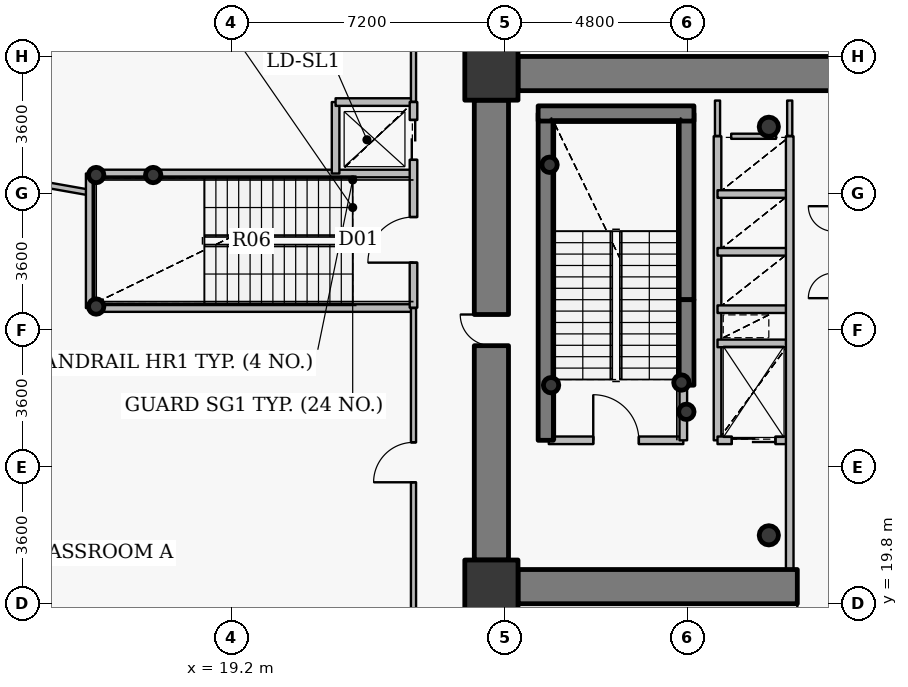
"""IFC4 building model, lengths in metres.
Left out: names, types, materials, properties, quantities, classifications, styles, units other than length and angle.
Written with IfcOpenShell. Run it as: python <this file> out.ifc"""

import sys

from ifc_helpers import new_model, si_unit, direction, frame, frame_2d, origin, origin_2d, place, context, subcontext, project, spatial, rectangle, hollow_circle, extrude, source, transform, mapped, element, fill, save


model = new_model("IFC4")
c1 = context("Model", 3, precision=1e-05, world=origin(), true_north=direction((0.0, 1.0)))
c2 = subcontext(c1, "Body", "Model", "MODEL_VIEW")
j1 = project(units=[si_unit("LENGTHUNIT", "METRE"), si_unit("PLANEANGLEUNIT", "RADIAN")], contexts=[c1])
p1 = place(None, origin())
s1 = spatial("IfcSite", under=j1, at=p1, CompositionType="ELEMENT")
p2 = place(p1, origin())
s2 = spatial("IfcBuilding", under=s1, at=p2, CompositionType="ELEMENT")
p3 = place(p2, frame((0.0, 0.0, 36.6)))
s3 = spatial("IfcBuildingStorey", under=s2, at=p3, CompositionType="ELEMENT", Elevation=36.6)
for number, where, z_axis, x_axis in (
    (1, (26.05, 20.25, 0.0), (0.0, 0.0, 1.0), (1.0, 0.0, 0.0)),
    (2, (26.05, 33.75, 0.0), (0.0, 0.0, 1.0), (1.0, 0.0, 0.0)),
):
    element("IfcColumn", number, at=place(p3, frame(where, z_axis=z_axis, x_axis=x_axis)), inside=s3, PredefinedType="COLUMN", context=c2, shape_type="SweptSolid", body=[
        extrude(rectangle(XDim=1.4, YDim=1.4, at=origin_2d()), origin(), (0.0, 0.0, 1.0), 4.2),
    ])
for number, where, z_axis, x_axis in (
    (3, (33.35, 21.6, 0.0), (0.0, 0.0, 1.0), (1.0, 0.0, 0.0)),
    (4, (33.35, 32.35, 0.0), (0.0, 0.0, 1.0), (1.0, 0.0, 0.0)),
):
    element("IfcColumn", number, at=place(p3, frame(where, z_axis=z_axis, x_axis=x_axis)), inside=s3, PredefinedType="COLUMN", context=c2, shape_type="SweptSolid", body=[
        extrude(hollow_circle(Radius=0.254, WallThickness=0.02, at=origin_2d()), origin(), (0.0, 0.0, 1.0), 4.2),
    ])
p4 = place(p3, frame((27.48, 24.1, 0.0), z_axis=(0.0, 0.0, 1.0), x_axis=(0.0, 1.0, 0.0)))
e5 = element("IfcWall", 5, at=p4, inside=s3, PredefinedType="SHEAR", context=c2, shape_type="SweptSolid", body=[
    extrude(rectangle(XDim=8.6, YDim=0.4, at=frame_2d((4.3, 0.0))), origin(), (0.0, 0.0, 1.0), 4.2),
])
p5 = place(p3, frame((31.18, 27.8, 0.0), z_axis=(0.0, 0.0, 1.0), x_axis=(0.0, 1.0, 0.0)))
e6 = element("IfcWall", 6, at=p5, inside=s3, PredefinedType="SHEAR", context=c2, shape_type="SweptSolid", body=[
    extrude(rectangle(XDim=4.9, YDim=0.4, at=frame_2d((2.45, 0.0))), origin(), (0.0, 0.0, 1.0), 4.2),
])
p6 = place(p3, frame((27.28, 32.7, 0.0), z_axis=(0.0, 0.0, 1.0), x_axis=(1.0, 0.0, 0.0)))
e7 = element("IfcWall", 7, at=p6, inside=s3, PredefinedType="SHEAR", context=c2, shape_type="SweptSolid", body=[
    extrude(rectangle(XDim=4.1, YDim=0.4, at=frame_2d((2.05, 0.0))), origin(), (0.0, 0.0, 1.0), 4.2),
])
for number, where, z_axis, x_axis in (
    (8, (27.58, 31.35, 0.0), (0.0, 0.0, 1.0), (1.0, 0.0, 0.0)),
    (9, (31.05, 25.62, 0.0), (0.0, 0.0, 1.0), (1.0, 0.0, 0.0)),
    (10, (31.18, 24.85, 0.0), (0.0, 0.0, 1.0), (1.0, 0.0, 0.0)),
    (11, (27.62, 25.55, 0.0), (0.0, 0.0, 1.0), (1.0, 0.0, 0.0)),
    (12, (15.65, 27.62, 0.0), (0.0, 0.0, 1.0), (1.0, 0.0, 0.0)),
    (13, (15.65, 31.08, 0.0), (0.0, 0.0, 1.0), (1.0, 0.0, 0.0)),
    (14, (17.15, 31.08, 0.0), (0.0, 0.0, 1.0), (1.0, 0.0, 0.0)),
):
    element("IfcColumn", number, at=place(p3, frame(where, z_axis=z_axis, x_axis=x_axis)), inside=s3, PredefinedType="COLUMN", context=c2, shape_type="SweptSolid", body=[
        extrude(hollow_circle(Radius=0.203, WallThickness=0.016, at=origin_2d()), origin(), (0.0, 0.0, 1.0), 4.2),
    ])
p7 = place(p3, frame((26.75, 33.75, 0.0), z_axis=(0.0, 0.0, 1.0), x_axis=(1.0, 0.0, 0.0)))
e15 = element("IfcWall", 15, at=p7, inside=s3, PredefinedType="SHEAR", context=c2, shape_type="SweptSolid", body=[
    extrude(rectangle(XDim=18.5, YDim=0.9, at=frame_2d((9.25, 0.0))), origin(), (0.0, 0.0, 1.0), 3.4),
])
p8 = place(p3, frame((45.25, 20.25, 0.0), z_axis=(0.0, 0.0, 1.0), x_axis=(-1.0, 0.0, 0.0)))
e16 = element("IfcWall", 16, at=p8, inside=s3, PredefinedType="SHEAR", context=c2, shape_type="SweptSolid", body=[
    extrude(rectangle(XDim=18.5, YDim=0.9, at=frame_2d((9.25, 0.0))), origin(), (0.0, 0.0, 1.0), 3.4),
])
p9 = place(p8, frame((10.0, 0.0, 0.0)))
e17 = element("IfcOpeningElement", 17, at=p9, cuts=e16, PredefinedType="OPENING", context=c2, shape_type="SweptSolid", body=[
    extrude(rectangle(XDim=1.15, YDim=2.15, at=origin_2d()), frame((0.575, 0.46, 1.075), z_axis=(0.0, -1.0, 0.0), x_axis=(1.0, 0.0, 0.0)), (0.0, 0.0, 1.0), 0.92),
])
p10 = place(p3, frame((26.05, 20.95, 0.0), z_axis=(0.0, 0.0, 1.0), x_axis=(0.0, 1.0, 0.0)))
e18 = element("IfcWall", 18, at=p10, inside=s3, PredefinedType="SHEAR", context=c2, shape_type="SweptSolid", body=[
    extrude(rectangle(XDim=12.1, YDim=0.9, at=frame_2d((6.05, 0.0))), origin(), (0.0, 0.0, 1.0), 3.4),
])
p11 = place(p10, frame((5.64, 0.0, 0.0)))
e19 = element("IfcOpeningElement", 19, at=p11, cuts=e18, PredefinedType="OPENING", context=c2, shape_type="SweptSolid", body=[
    extrude(rectangle(XDim=0.82, YDim=2.1, at=origin_2d()), frame((0.41, 0.46, 1.05), z_axis=(0.0, -1.0, 0.0), x_axis=(1.0, 0.0, 0.0)), (0.0, 0.0, 1.0), 0.92),
])
p12 = place(p3, frame((31.18, 25.55, 0.0), z_axis=(0.0, 0.0, 1.0), x_axis=(0.0, 1.0, 0.0)))
e20 = element("IfcWall", 20, at=p12, inside=s3, PredefinedType="SHEAR", context=c2, shape_type="SweptSolid", body=[
    extrude(rectangle(XDim=2.25, YDim=0.4, at=frame_2d((1.125, 0.0))), origin(), (0.0, 0.0, 1.0), 3.55),
])
p13 = place(p3, frame((5.771, 32.33, 0.0), z_axis=(0.0, 0.0, 1.0), x_axis=(0.984806985247, -0.173652531825, 0.0)))
e21 = element("IfcWall", 21, at=p13, inside=s3, PredefinedType="PARTITIONING", context=c2, shape_type="SweptSolid", body=[
    extrude(rectangle(XDim=9.858, YDim=0.15, at=frame_2d((4.929, 0.0))), origin(), (0.0, 0.0, 1.0), 3.335),
])
p14 = place(p3, frame((15.48, 27.58, 0.0), z_axis=(0.0, 0.0, 1.0), x_axis=(0.0, 1.0, 0.0)))
e22 = element("IfcWall", 22, at=p14, inside=s3, PredefinedType="PARTITIONING", context=c2, shape_type="SweptSolid", body=[
    extrude(rectangle(XDim=3.54, YDim=0.2, at=frame_2d((1.77, 0.0))), origin(), (0.0, 0.0, 1.0), 3.95),
])
for number, where, z_axis, x_axis in (
    (23, (15.48, 27.58, 0.0), (0.0, 0.0, 1.0), (1.0, 0.0, 0.0)),
    (24, (15.48, 31.12, 0.0), (0.0, 0.0, 1.0), (1.0, 0.0, 0.0)),
):
    element("IfcWall", number, at=place(p3, frame(where, z_axis=z_axis, x_axis=x_axis)), inside=s3, PredefinedType="PARTITIONING", context=c2, shape_type="SweptSolid", body=[
        extrude(rectangle(XDim=8.52, YDim=0.2, at=frame_2d((4.26, 0.0))), origin(), (0.0, 0.0, 1.0), 3.95),
    ])
p15 = place(p3, frame((21.95, 31.12, 0.0), z_axis=(0.0, 0.0, 1.0), x_axis=(0.0, 1.0, 0.0)))
e25 = element("IfcWall", 25, at=p15, inside=s3, PredefinedType="PARTITIONING", context=c2, shape_type="SweptSolid", body=[
    extrude(rectangle(XDim=1.88, YDim=0.2, at=frame_2d((0.94, 0.0))), origin(), (0.0, 0.0, 1.0), 3.285),
])
p16 = place(p3, frame((21.95, 33.0, 0.0), z_axis=(0.0, 0.0, 1.0), x_axis=(1.0, 0.0, 0.0)))
e26 = element("IfcWall", 26, at=p16, inside=s3, PredefinedType="PARTITIONING", context=c2, shape_type="SweptSolid", body=[
    extrude(rectangle(XDim=2.05, YDim=0.2, at=frame_2d((1.025, 0.0))), origin(), (0.0, 0.0, 1.0), 3.95),
])
p17 = place(p3, frame((24.0, 14.8, 0.0), z_axis=(0.0, 0.0, 1.0), x_axis=(0.0, 1.0, 0.0)))
e27 = element("IfcWall", 27, at=p17, inside=s3, PredefinedType="PARTITIONING", context=c2, shape_type="SweptSolid", body=[
    extrude(rectangle(XDim=12.78, YDim=0.135, at=frame_2d((6.39, 0.0))), origin(), (0.0, 0.0, 1.0), 3.285),
])
p18 = place(p17, frame((8.196, 0.0, 0.0)))
e28 = element("IfcOpeningElement", 28, at=p18, cuts=e27, PredefinedType="OPENING", context=c2, shape_type="SweptSolid", body=[
    extrude(rectangle(XDim=1.05, YDim=2.15, at=origin_2d()), frame((0.525, 0.078, 1.075), z_axis=(0.0, -1.0, 0.0), x_axis=(1.0, 0.0, 0.0)), (0.0, 0.0, 1.0), 0.155),
])
p19 = place(p3, frame((24.0, 27.59, 0.0), z_axis=(0.0, 0.0, 1.0), x_axis=(0.0, 1.0, 0.0)))
e29 = element("IfcWall", 29, at=p19, inside=s3, PredefinedType="PARTITIONING", context=c2, shape_type="SweptSolid", body=[
    extrude(rectangle(XDim=5.41, YDim=0.2, at=frame_2d((2.705, 0.0))), origin(), (0.0, 0.0, 1.0), 3.285),
])
p20 = place(p19, frame((1.185, 0.0, 0.0)))
e30 = element("IfcOpeningElement", 30, at=p20, cuts=e29, PredefinedType="OPENING", context=c2, shape_type="SweptSolid", body=[
    extrude(rectangle(XDim=1.2, YDim=2.15, at=origin_2d()), frame((0.6, 0.11, 1.075), z_axis=(0.0, -1.0, 0.0), x_axis=(1.0, 0.0, 0.0)), (0.0, 0.0, 1.0), 0.22),
])
p21 = place(p19, frame((3.89, 0.0, 0.0)))
e31 = element("IfcOpeningElement", 31, at=p21, cuts=e29, PredefinedType="OPENING", context=c2, shape_type="SweptSolid", body=[
    extrude(rectangle(XDim=1.05, YDim=2.15, at=origin_2d()), frame((0.525, 0.11, 1.075), z_axis=(0.0, -1.0, 0.0), x_axis=(1.0, 0.0, 0.0)), (0.0, 0.0, 1.0), 0.22),
])
p22 = place(p3, frame((24.0, 33.01, 0.0), z_axis=(0.0, 0.0, 1.0), x_axis=(0.0, 1.0, 0.0)))
e32 = element("IfcWall", 32, at=p22, inside=s3, PredefinedType="PARTITIONING", context=c2, shape_type="SweptSolid", body=[
    extrude(rectangle(XDim=8.19, YDim=0.135, at=frame_2d((4.095, 0.0))), origin(), (0.0, 0.0, 1.0), 3.285),
])
p23 = place(p22, frame((3.57, 0.0, 0.0)))
e33 = element("IfcOpeningElement", 33, at=p23, cuts=e32, PredefinedType="OPENING", context=c2, shape_type="SweptSolid", body=[
    extrude(rectangle(XDim=1.05, YDim=2.15, at=origin_2d()), frame((0.525, 0.078, 1.075), z_axis=(0.0, -1.0, 0.0), x_axis=(1.0, 0.0, 0.0)), (0.0, 0.0, 1.0), 0.155),
])
p24 = place(p3, frame((27.56, 24.1, 0.0), z_axis=(0.0, 0.0, 1.0), x_axis=(1.0, 0.0, 0.0)))
e34 = element("IfcWall", 34, at=p24, inside=s3, PredefinedType="PARTITIONING", context=c2, shape_type="SweptSolid", body=[
    extrude(rectangle(XDim=3.54, YDim=0.2, at=frame_2d((1.77, 0.0))), origin(), (0.0, 0.0, 1.0), 3.95),
])
p25 = place(p24, frame((1.17, 0.0, 0.0)))
e35 = element("IfcOpeningElement", 35, at=p25, cuts=e34, PredefinedType="OPENING", context=c2, shape_type="SweptSolid", body=[
    extrude(rectangle(XDim=1.2, YDim=2.15, at=origin_2d()), frame((0.6, 0.11, 1.075), z_axis=(0.0, -1.0, 0.0), x_axis=(1.0, 0.0, 0.0)), (0.0, 0.0, 1.0), 0.22),
])
p26 = place(p3, frame((31.1, 24.1, 0.0), z_axis=(0.0, 0.0, 1.0), x_axis=(0.0, 1.0, 0.0)))
e36 = element("IfcWall", 36, at=p26, inside=s3, PredefinedType="PARTITIONING", context=c2, shape_type="SweptSolid", body=[
    extrude(rectangle(XDim=1.44, YDim=0.2, at=frame_2d((0.72, 0.0))), origin(), (0.0, 0.0, 1.0), 3.95),
])
p27 = place(p3, frame((32.0, 24.1, 0.0), z_axis=(0.0, 0.0, 1.0), x_axis=(0.0, 1.0, 0.0)))
e37 = element("IfcWall", 37, at=p27, inside=s3, PredefinedType="PARTITIONING", context=c2, shape_type="SweptSolid", body=[
    extrude(rectangle(XDim=8.0, YDim=0.2, at=frame_2d((4.0, 0.0))), origin(), (0.0, 0.0, 1.0), 3.95),
])
p28 = place(p3, frame((32.0, 24.1, 0.0), z_axis=(0.0, 0.0, 1.0), x_axis=(1.0, 0.0, 0.0)))
e38 = element("IfcWall", 38, at=p28, inside=s3, PredefinedType="PARTITIONING", context=c2, shape_type="SweptSolid", body=[
    extrude(rectangle(XDim=1.9, YDim=0.2, at=frame_2d((0.95, 0.0))), origin(), (0.0, 0.0, 1.0), 3.535),
])
p29 = place(p28, frame((0.375, 0.0, 0.0)))
e39 = element("IfcOpeningElement", 39, at=p29, cuts=e38, PredefinedType="OPENING", context=c2, shape_type="SweptSolid", body=[
    extrude(rectangle(XDim=1.15, YDim=2.15, at=origin_2d()), frame((0.575, 0.11, 1.075), z_axis=(0.0, -1.0, 0.0), x_axis=(1.0, 0.0, 0.0)), (0.0, 0.0, 1.0), 0.22),
])
for number, where, z_axis, x_axis in (
    (40, (32.0, 26.65, 0.0), (0.0, 0.0, 1.0), (1.0, 0.0, 0.0)),
    (41, (32.0, 27.55, 0.0), (0.0, 0.0, 1.0), (1.0, 0.0, 0.0)),
    (42, (32.0, 29.06, 0.0), (0.0, 0.0, 1.0), (1.0, 0.0, 0.0)),
    (43, (32.0, 30.58, 0.0), (0.0, 0.0, 1.0), (1.0, 0.0, 0.0)),
):
    element("IfcWall", number, at=place(p3, frame(where, z_axis=z_axis, x_axis=x_axis)), inside=s3, PredefinedType="PARTITIONING", context=c2, shape_type="SweptSolid", body=[
        extrude(rectangle(XDim=1.9, YDim=0.2, at=frame_2d((0.95, 0.0))), origin(), (0.0, 0.0, 1.0), 3.535),
    ])
p30 = place(p3, frame((33.9, 20.7, 0.0), z_axis=(0.0, 0.0, 1.0), x_axis=(0.0, 1.0, 0.0)))
e44 = element("IfcWall", 44, at=p30, inside=s3, PredefinedType="PARTITIONING", context=c2, shape_type="SweptSolid", body=[
    extrude(rectangle(XDim=11.4, YDim=0.2, at=frame_2d((5.7, 0.0))), origin(), (0.0, 0.0, 1.0), 3.535),
])
p31 = place(p3, frame((32.36, 32.1, 0.0), z_axis=(0.0, 0.0, 1.0), x_axis=(1.0, 0.0, 0.0)))
e45 = element("IfcWall", 45, at=p31, inside=s3, PredefinedType="PARTITIONING", context=c2, shape_type="SweptSolid", body=[
    extrude(rectangle(XDim=1.18, YDim=0.135, at=frame_2d((0.59, 0.0))), origin(), (0.0, 0.0, 1.0), 3.535),
])
p32 = place(p3, frame((32.0, 33.04, 0.0), z_axis=(0.0, 0.0, 1.0), x_axis=(0.0, -1.0, 0.0)))
e46 = element("IfcWall", 46, at=p32, inside=s3, PredefinedType="PARTITIONING", context=c2, shape_type="SweptSolid", body=[
    extrude(rectangle(XDim=0.93, YDim=0.135, at=frame_2d((0.465, 0.0))), origin(), (0.0, 0.0, 1.0), 3.485),
])
p33 = place(p3, frame((33.9, 32.11, 0.0), z_axis=(0.0, 0.0, 1.0), x_axis=(0.0, 1.0, 0.0)))
e47 = element("IfcWall", 47, at=p33, inside=s3, PredefinedType="PARTITIONING", context=c2, shape_type="SweptSolid", body=[
    extrude(rectangle(XDim=0.93, YDim=0.135, at=frame_2d((0.465, 0.0))), origin(), (0.0, 0.0, 1.0), 3.535),
])
p34 = place(p3, frame((25.95, 38.893, 0.0), z_axis=(0.0, 0.0, 1.0), x_axis=(0.0, -1.0, 0.0)))
e48 = element("IfcWall", 48, at=p34, inside=s3, PredefinedType="PARTITIONING", context=c2, shape_type="SweptSolid", body=[
    extrude(rectangle(XDim=4.693, YDim=0.135, at=frame_2d((2.346, 0.0))), origin(), (0.0, 0.0, 1.0), 3.285),
])
for number, where, z_axis, x_axis in (
    (49, (25.6, 34.2, 0.0), (0.0, 0.0, 1.0), (0.0, -1.0, 0.0)),
    (50, (25.6, 20.94, 0.0), (0.0, 0.0, 1.0), (0.0, -1.0, 0.0)),
):
    element("IfcWall", number, at=place(p3, frame(where, z_axis=z_axis, x_axis=x_axis)), inside=s3, PredefinedType="PARTITIONING", context=c2, shape_type="SweptSolid", body=[
        extrude(rectangle(XDim=1.14, YDim=0.135, at=frame_2d((0.57, 0.0))), origin(), (0.0, 0.0, 1.0), 3.95),
    ])
p35 = place(p3, frame((25.907, 19.8, 0.0), z_axis=(0.0, 0.0, 1.0), x_axis=(1.0, 0.0, 0.0)))
e51 = element("IfcWall", 51, at=p35, inside=s3, PredefinedType="PARTITIONING", context=c2, shape_type="SweptSolid", body=[
    extrude(rectangle(XDim=0.833, YDim=0.135, at=frame_2d((0.416, 0.0))), origin(), (0.0, 0.0, 1.0), 3.285),
])
m1 = source(origin(), c2, "Body", "SweptSolid", [
    extrude(rectangle(XDim=0.82, YDim=2.1, at=origin_2d()), frame((0.41, 0.025, 1.05), z_axis=(0.0, -1.0, 0.0), x_axis=(1.0, 0.0, 0.0)), (0.0, 0.0, 1.0), 0.05),
])
p36 = place(p11, origin())
e52 = element("IfcDoor", 52, at=p36, inside=s3, OperationType="SINGLE_SWING_RIGHT", PredefinedType="DOOR", context=c2, shape_type="MappedRepresentation", body=[
    mapped(m1, transform((0.0, 0.0, 0.0), x_axis=(1.0, 0.0, 0.0), y_axis=(0.0, 1.0, 0.0), z_axis=(0.0, 0.0, 1.0), scale=1.0)),
])
fill(e19, e52)
m2 = source(origin(), c2, "Body", "SweptSolid", [
    extrude(rectangle(XDim=1.15, YDim=2.15, at=origin_2d()), frame((0.575, 0.025, 1.075), z_axis=(0.0, -1.0, 0.0), x_axis=(1.0, 0.0, 0.0)), (0.0, 0.0, 1.0), 0.05),
])
p37 = place(p9, origin())
e53 = element("IfcDoor", 53, at=p37, inside=s3, OperationType="SINGLE_SWING_RIGHT", PredefinedType="DOOR", context=c2, shape_type="MappedRepresentation", body=[
    mapped(m2, transform((0.0, 0.0, 0.0), x_axis=(1.0, 0.0, 0.0), y_axis=(0.0, 1.0, 0.0), z_axis=(0.0, 0.0, 1.0), scale=1.0)),
])
fill(e17, e53)
m3 = source(origin(), c2, "Body", "SweptSolid", [
    extrude(rectangle(XDim=1.2, YDim=2.15, at=origin_2d()), frame((0.6, 0.025, 1.075), z_axis=(0.0, -1.0, 0.0), x_axis=(1.0, 0.0, 0.0)), (0.0, 0.0, 1.0), 0.05),
])
p38 = place(p25, origin())
e54 = element("IfcDoor", 54, at=p38, inside=s3, OperationType="SINGLE_SWING_LEFT", PredefinedType="DOOR", context=c2, shape_type="MappedRepresentation", body=[
    mapped(m3, transform((0.0, 0.0, 0.0), x_axis=(1.0, 0.0, 0.0), y_axis=(0.0, 1.0, 0.0), z_axis=(0.0, 0.0, 1.0), scale=1.0)),
])
fill(e35, e54)
p39 = place(p20, origin())
e55 = element("IfcDoor", 55, at=p39, inside=s3, OperationType="SINGLE_SWING_LEFT", PredefinedType="DOOR", context=c2, shape_type="MappedRepresentation", body=[
    mapped(m3, transform((0.0, 0.0, 0.0), x_axis=(1.0, 0.0, 0.0), y_axis=(0.0, 1.0, 0.0), z_axis=(0.0, 0.0, 1.0), scale=1.0)),
])
fill(e30, e55)
m4 = source(origin(), c2, "Body", "SweptSolid", [
    extrude(rectangle(XDim=1.15, YDim=2.15, at=origin_2d()), frame((0.575, 0.025, 1.075), z_axis=(0.0, -1.0, 0.0), x_axis=(1.0, 0.0, 0.0)), (0.0, 0.0, 1.0), 0.05),
])
p40 = place(p29, origin())
e56 = element("IfcDoor", 56, at=p40, inside=s3, OperationType="DOUBLE_DOOR_SLIDING", PredefinedType="USERDEFINED", context=c2, shape_type="MappedRepresentation", body=[
    mapped(m4, transform((0.0, 0.0, 0.0), x_axis=(1.0, 0.0, 0.0), y_axis=(0.0, 1.0, 0.0), z_axis=(0.0, 0.0, 1.0), scale=1.0)),
])
fill(e39, e56)
m5 = source(origin(), c2, "Body", "SweptSolid", [
    extrude(rectangle(XDim=1.05, YDim=2.15, at=origin_2d()), frame((0.525, 0.025, 1.075), z_axis=(0.0, -1.0, 0.0), x_axis=(1.0, 0.0, 0.0)), (0.0, 0.0, 1.0), 0.05),
])
p41 = place(p21, origin())
e57 = element("IfcDoor", 57, at=p41, inside=s3, OperationType="DOUBLE_DOOR_SLIDING", PredefinedType="USERDEFINED", context=c2, shape_type="MappedRepresentation", body=[
    mapped(m5, transform((0.0, 0.0, 0.0), x_axis=(1.0, 0.0, 0.0), y_axis=(0.0, 1.0, 0.0), z_axis=(0.0, 0.0, 1.0), scale=1.0)),
])
fill(e31, e57)
m6 = source(origin(), c2, "Body", "SweptSolid", [
    extrude(rectangle(XDim=1.05, YDim=2.15, at=origin_2d()), frame((0.525, 0.025, 1.075), z_axis=(0.0, -1.0, 0.0), x_axis=(1.0, 0.0, 0.0)), (0.0, 0.0, 1.0), 0.05),
])
p42 = place(p18, origin())
e58 = element("IfcDoor", 58, at=p42, inside=s3, OperationType="SINGLE_SWING_LEFT", PredefinedType="DOOR", context=c2, shape_type="MappedRepresentation", body=[
    mapped(m6, transform((0.0, 0.0, 0.0), x_axis=(1.0, 0.0, 0.0), y_axis=(0.0, 1.0, 0.0), z_axis=(0.0, 0.0, 1.0), scale=1.0)),
])
fill(e28, e58)
save(model, sys.argv[1])
